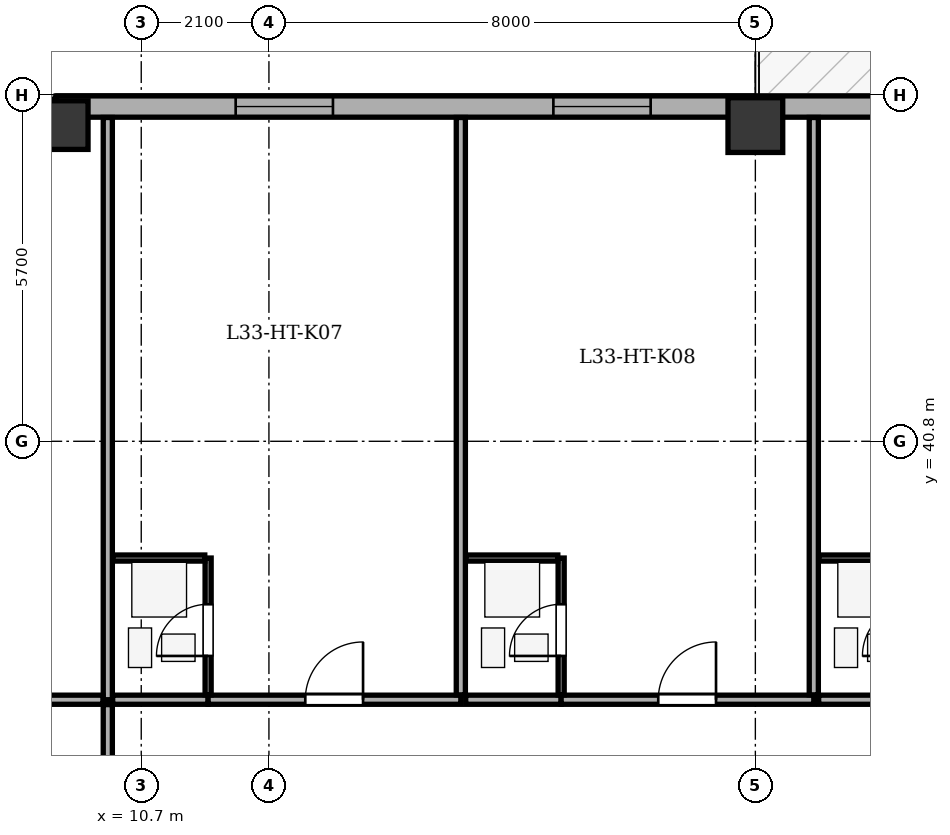
"""IFC4 building model, lengths in metres.
Left out: names, types, materials, properties, quantities, classifications, styles, units other than length and angle.
Written with IfcOpenShell. Run it as: python <this file> out.ifc"""

import sys

from ifc_helpers import new_model, si_unit, direction, frame, frame_2d, origin, origin_2d, place, context, subcontext, project, spatial, rectangle, extrude, element, fill, save


model = new_model("IFC4")
c1 = context("Model", 3, precision=1e-05, world=origin(), true_north=direction((0.0, 1.0)))
c2 = subcontext(c1, "Body", "Model", "MODEL_VIEW")
j1 = project(units=[si_unit("LENGTHUNIT", "METRE"), si_unit("PLANEANGLEUNIT", "RADIAN")], contexts=[c1])
p1 = place(None, origin())
s1 = spatial("IfcSite", under=j1, at=p1, CompositionType="ELEMENT")
p2 = place(p1, origin())
s2 = spatial("IfcBuilding", under=s1, at=p2, CompositionType="ELEMENT")
p3 = place(p2, frame((0.0, 0.0, 134.3)))
s3 = spatial("IfcBuildingStorey", under=s2, at=p3, CompositionType="ELEMENT", Elevation=134.3)
p4 = place(p3, frame((9.3, 46.0, 0.0), z_axis=(0.0, 0.0, 1.0), x_axis=(1.0, 0.0, 0.0)))
e1 = element("IfcColumn", 1, at=p4, inside=s3, PredefinedType="COLUMN", context=c2, shape_type="SweptSolid", body=[
    extrude(rectangle(XDim=0.8, YDim=1.05, at=origin_2d()), origin(), (0.0, 0.0, 1.0), 3.5),
])
p5 = place(p3, frame((20.8, 46.0, 0.0), z_axis=(0.0, 0.0, 1.0), x_axis=(1.0, 0.0, 0.0)))
e2 = element("IfcColumn", 2, at=p5, inside=s3, PredefinedType="COLUMN", context=c2, shape_type="SweptSolid", body=[
    extrude(rectangle(XDim=0.9, YDim=0.9, at=origin_2d()), origin(), (0.0, 0.0, 1.0), 3.5),
])
p6 = place(p3, frame((4.495, 41.5, 0.0), z_axis=(0.0, 0.0, 1.0), x_axis=(0.707106781187, 0.707106781187, 0.0)))
e3 = element("IfcWall", 3, at=p6, inside=s3, PredefinedType="STANDARD", context=c2, shape_type="SweptSolid", body=[
    extrude(rectangle(XDim=6.795, YDim=0.35, at=frame_2d((3.397, 0.0))), origin(), (0.0, 0.0, 1.0), 2.785),
])
p7 = place(p6, frame((2.698, 0.0, 0.75)))
e4 = element("IfcOpeningElement", 4, at=p7, cuts=e3, PredefinedType="OPENING", context=c2, shape_type="SweptSolid", body=[
    extrude(rectangle(XDim=1.4, YDim=1.65, at=frame_2d((0.7, 0.825))), frame((0.0, 0.185, 0.0), z_axis=(0.0, -1.0, 0.0), x_axis=(1.0, 0.0, 0.0)), (0.0, 0.0, 1.0), 0.37),
])
p8 = place(p3, frame((9.3, 46.305, 0.0), z_axis=(0.0, 0.0, 1.0), x_axis=(1.0, 0.0, 0.0)))
e5 = element("IfcWall", 5, at=p8, inside=s3, PredefinedType="STANDARD", context=c2, shape_type="SweptSolid", body=[
    extrude(rectangle(XDim=35.0, YDim=0.35, at=frame_2d((17.5, 0.0))), origin(), (0.0, 0.0, 1.0), 2.785),
])
p9 = place(p8, frame((14.4, 0.0, 0.0)))
e6 = element("IfcOpeningElement", 6, at=p9, cuts=e5, PredefinedType="OPENING", context=c2, shape_type="SweptSolid", body=[
    extrude(rectangle(XDim=1.0, YDim=2.02, at=frame_2d((0.5, 1.01))), frame((0.0, 0.185, 0.0), z_axis=(0.0, -1.0, 0.0), x_axis=(1.0, 0.0, 0.0)), (0.0, 0.0, 1.0), 0.37),
])
p10 = place(p8, frame((2.953, 0.0, 0.75)))
e7 = element("IfcOpeningElement", 7, at=p10, cuts=e5, PredefinedType="OPENING", context=c2, shape_type="SweptSolid", body=[
    extrude(rectangle(XDim=1.6, YDim=1.75, at=frame_2d((0.8, 0.875))), frame((0.0, 0.185, 0.0), z_axis=(0.0, -1.0, 0.0), x_axis=(1.0, 0.0, 0.0)), (0.0, 0.0, 1.0), 0.37),
])
p11 = place(p8, frame((8.178, 0.0, 0.75)))
e8 = element("IfcOpeningElement", 8, at=p11, cuts=e5, PredefinedType="OPENING", context=c2, shape_type="SweptSolid", body=[
    extrude(rectangle(XDim=1.6, YDim=1.75, at=frame_2d((0.8, 0.875))), frame((0.0, 0.185, 0.0), z_axis=(0.0, -1.0, 0.0), x_axis=(1.0, 0.0, 0.0)), (0.0, 0.0, 1.0), 0.37),
])
p12 = place(p8, frame((20.686, 0.0, 0.75)))
e9 = element("IfcOpeningElement", 9, at=p12, cuts=e5, PredefinedType="OPENING", context=c2, shape_type="SweptSolid", body=[
    extrude(rectangle(XDim=1.6, YDim=1.75, at=frame_2d((0.8, 0.875))), frame((0.0, 0.185, 0.0), z_axis=(0.0, -1.0, 0.0), x_axis=(1.0, 0.0, 0.0)), (0.0, 0.0, 1.0), 0.37),
])
p13 = place(p8, frame((27.143, 0.0, 0.75)))
e10 = element("IfcOpeningElement", 10, at=p13, cuts=e5, PredefinedType="OPENING", context=c2, shape_type="SweptSolid", body=[
    extrude(rectangle(XDim=1.35, YDim=1.75, at=frame_2d((0.675, 0.875))), frame((0.0, 0.185, 0.0), z_axis=(0.0, -1.0, 0.0), x_axis=(1.0, 0.0, 0.0)), (0.0, 0.0, 1.0), 0.37),
])
p14 = place(p8, frame((31.33, 0.0, 0.75)))
e11 = element("IfcOpeningElement", 11, at=p14, cuts=e5, PredefinedType="OPENING", context=c2, shape_type="SweptSolid", body=[
    extrude(rectangle(XDim=1.6, YDim=1.75, at=frame_2d((0.8, 0.875))), frame((0.0, 0.185, 0.0), z_axis=(0.0, -1.0, 0.0), x_axis=(1.0, 0.0, 0.0)), (0.0, 0.0, 1.0), 0.37),
])
p15 = place(p3, frame((10.15, 36.55, 0.0), z_axis=(0.0, 0.0, 1.0), x_axis=(0.0, 1.0, 0.0)))
e12 = element("IfcWall", 12, at=p15, inside=s3, PredefinedType="PARTITIONING", context=c2, shape_type="SweptSolid", body=[
    extrude(rectangle(XDim=9.575, YDim=0.15, at=frame_2d((4.788, 0.0))), origin(), (0.0, 0.0, 1.0), 3.2),
])
p16 = place(p3, frame((10.23, 36.55, 0.0), z_axis=(0.0, 0.0, 1.0), x_axis=(1.0, 0.0, 0.0)))
e13 = element("IfcWall", 13, at=p16, inside=s3, PredefinedType="PARTITIONING", context=c2, shape_type="SweptSolid", body=[
    extrude(rectangle(XDim=1.57, YDim=0.15, at=frame_2d((0.785, 0.0))), origin(), (0.0, 0.0, 1.0), 3.2),
])
p17 = place(p3, frame((11.8, 36.55, 0.0), z_axis=(0.0, 0.0, 1.0), x_axis=(1.0, 0.0, 0.0)))
e14 = element("IfcWall", 14, at=p17, inside=s3, PredefinedType="PARTITIONING", context=c2, shape_type="SweptSolid", body=[
    extrude(rectangle(XDim=4.156, YDim=0.15, at=frame_2d((2.078, 0.0))), origin(), (0.0, 0.0, 1.0), 3.2),
])
p18 = place(p17, frame((1.598, 0.0, 0.0)))
e15 = element("IfcOpeningElement", 15, at=p18, cuts=e14, PredefinedType="OPENING", context=c2, shape_type="SweptSolid", body=[
    extrude(rectangle(XDim=0.95, YDim=2.1, at=frame_2d((0.475, 1.05))), frame((0.0, 0.085, 0.0), z_axis=(0.0, -1.0, 0.0), x_axis=(1.0, 0.0, 0.0)), (0.0, 0.0, 1.0), 0.17),
])
p19 = place(p3, frame((11.8, 36.63, 0.0), z_axis=(0.0, 0.0, 1.0), x_axis=(0.0, 1.0, 0.0)))
e16 = element("IfcWall", 16, at=p19, inside=s3, PredefinedType="PARTITIONING", context=c2, shape_type="SweptSolid", body=[
    extrude(rectangle(XDim=2.25, YDim=0.1, at=frame_2d((1.125, 0.0))), origin(), (0.0, 0.0, 1.0), 3.2),
])
p20 = place(p19, frame((0.64, 0.0, 0.0)))
e17 = element("IfcOpeningElement", 17, at=p20, cuts=e16, PredefinedType="OPENING", context=c2, shape_type="SweptSolid", body=[
    extrude(rectangle(XDim=0.85, YDim=2.05, at=frame_2d((0.425, 1.025))), frame((0.0, 0.06, 0.0), z_axis=(0.0, -1.0, 0.0), x_axis=(1.0, 0.0, 0.0)), (0.0, 0.0, 1.0), 0.12),
])
p21 = place(p3, frame((10.23, 38.88, 0.0), z_axis=(0.0, 0.0, 1.0), x_axis=(1.0, 0.0, 0.0)))
e18 = element("IfcWall", 18, at=p21, inside=s3, PredefinedType="PARTITIONING", context=c2, shape_type="SweptSolid", body=[
    extrude(rectangle(XDim=1.515, YDim=0.1, at=frame_2d((0.758, 0.0))), origin(), (0.0, 0.0, 1.0), 3.2),
])
p22 = place(p3, frame((15.956, 36.63, 0.0), z_axis=(0.0, 0.0, 1.0), x_axis=(0.0, 1.0, 0.0)))
e19 = element("IfcWall", 19, at=p22, inside=s3, PredefinedType="PARTITIONING", context=c2, shape_type="SweptSolid", body=[
    extrude(rectangle(XDim=9.495, YDim=0.15, at=frame_2d((4.748, 0.0))), origin(), (0.0, 0.0, 1.0), 3.2),
])
p23 = place(p3, frame((16.036, 36.55, 0.0), z_axis=(0.0, 0.0, 1.0), x_axis=(1.0, 0.0, 0.0)))
e20 = element("IfcWall", 20, at=p23, inside=s3, PredefinedType="PARTITIONING", context=c2, shape_type="SweptSolid", body=[
    extrude(rectangle(XDim=1.57, YDim=0.15, at=frame_2d((0.785, 0.0))), origin(), (0.0, 0.0, 1.0), 3.2),
])
p24 = place(p3, frame((17.606, 36.55, 0.0), z_axis=(0.0, 0.0, 1.0), x_axis=(1.0, 0.0, 0.0)))
e21 = element("IfcWall", 21, at=p24, inside=s3, PredefinedType="PARTITIONING", context=c2, shape_type="SweptSolid", body=[
    extrude(rectangle(XDim=4.155, YDim=0.15, at=frame_2d((2.078, 0.0))), origin(), (0.0, 0.0, 1.0), 3.2),
])
p25 = place(p24, frame((1.597, 0.0, 0.0)))
e22 = element("IfcOpeningElement", 22, at=p25, cuts=e21, PredefinedType="OPENING", context=c2, shape_type="SweptSolid", body=[
    extrude(rectangle(XDim=0.95, YDim=2.1, at=frame_2d((0.475, 1.05))), frame((0.0, 0.085, 0.0), z_axis=(0.0, -1.0, 0.0), x_axis=(1.0, 0.0, 0.0)), (0.0, 0.0, 1.0), 0.17),
])
p26 = place(p3, frame((17.606, 36.63, 0.0), z_axis=(0.0, 0.0, 1.0), x_axis=(0.0, 1.0, 0.0)))
e23 = element("IfcWall", 23, at=p26, inside=s3, PredefinedType="PARTITIONING", context=c2, shape_type="SweptSolid", body=[
    extrude(rectangle(XDim=2.25, YDim=0.1, at=frame_2d((1.125, 0.0))), origin(), (0.0, 0.0, 1.0), 3.2),
])
p27 = place(p26, frame((0.64, 0.0, 0.0)))
e24 = element("IfcOpeningElement", 24, at=p27, cuts=e23, PredefinedType="OPENING", context=c2, shape_type="SweptSolid", body=[
    extrude(rectangle(XDim=0.85, YDim=2.05, at=frame_2d((0.425, 1.025))), frame((0.0, 0.06, 0.0), z_axis=(0.0, -1.0, 0.0), x_axis=(1.0, 0.0, 0.0)), (0.0, 0.0, 1.0), 0.12),
])
p28 = place(p3, frame((16.036, 38.88, 0.0), z_axis=(0.0, 0.0, 1.0), x_axis=(1.0, 0.0, 0.0)))
e25 = element("IfcWall", 25, at=p28, inside=s3, PredefinedType="PARTITIONING", context=c2, shape_type="SweptSolid", body=[
    extrude(rectangle(XDim=1.515, YDim=0.1, at=frame_2d((0.758, 0.0))), origin(), (0.0, 0.0, 1.0), 3.2),
])
p29 = place(p3, frame((21.761, 36.63, 0.0), z_axis=(0.0, 0.0, 1.0), x_axis=(0.0, 1.0, 0.0)))
e26 = element("IfcWall", 26, at=p29, inside=s3, PredefinedType="PARTITIONING", context=c2, shape_type="SweptSolid", body=[
    extrude(rectangle(XDim=9.495, YDim=0.15, at=frame_2d((4.748, 0.0))), origin(), (0.0, 0.0, 1.0), 3.2),
])
p30 = place(p3, frame((21.841, 36.55, 0.0), z_axis=(0.0, 0.0, 1.0), x_axis=(1.0, 0.0, 0.0)))
e27 = element("IfcWall", 27, at=p30, inside=s3, PredefinedType="PARTITIONING", context=c2, shape_type="SweptSolid", body=[
    extrude(rectangle(XDim=1.57, YDim=0.15, at=frame_2d((0.785, 0.0))), origin(), (0.0, 0.0, 1.0), 3.2),
])
p31 = place(p3, frame((21.841, 38.88, 0.0), z_axis=(0.0, 0.0, 1.0), x_axis=(1.0, 0.0, 0.0)))
e28 = element("IfcWall", 28, at=p31, inside=s3, PredefinedType="PARTITIONING", context=c2, shape_type="SweptSolid", body=[
    extrude(rectangle(XDim=1.515, YDim=0.1, at=frame_2d((0.757, 0.0))), origin(), (0.0, 0.0, 1.0), 3.2),
])
p32 = place(p3, frame((4.675, 36.55, 0.0), z_axis=(0.0, 0.0, 1.0), x_axis=(1.0, 0.0, 0.0)))
e29 = element("IfcWall", 29, at=p32, inside=s3, PredefinedType="PARTITIONING", context=c2, shape_type="SweptSolid", body=[
    extrude(rectangle(XDim=5.395, YDim=0.15, at=frame_2d((2.698, 0.0))), origin(), (0.0, 0.0, 1.0), 3.2),
])
p33 = place(p3, frame((10.15, 27.28, 0.0), z_axis=(0.0, 0.0, 1.0), x_axis=(0.0, 1.0, 0.0)))
e30 = element("IfcWall", 30, at=p33, inside=s3, PredefinedType="PARTITIONING", context=c2, shape_type="SweptSolid", body=[
    extrude(rectangle(XDim=9.19, YDim=0.15, at=frame_2d((4.595, 0.0))), origin(), (0.0, 0.0, 1.0), 3.2),
])
p34 = place(p33, frame((4.115, 0.0, 0.0)))
e31 = element("IfcOpeningElement", 31, at=p34, cuts=e30, PredefinedType="OPENING", context=c2, shape_type="SweptSolid", body=[
    extrude(rectangle(XDim=0.95, YDim=2.1, at=frame_2d((0.475, 1.05))), frame((0.0, 0.085, 0.0), z_axis=(0.0, -1.0, 0.0), x_axis=(1.0, 0.0, 0.0)), (0.0, 0.0, 1.0), 0.17),
])
p35 = place(p10, origin())
e32 = element("IfcWindow", 32, at=p35, inside=s3, PartitioningType="SINGLE_PANEL", PredefinedType="WINDOW", context=c2, shape_type="SweptSolid", body=[
    extrude(rectangle(XDim=1.6, YDim=1.75, at=frame_2d((0.8, 0.875))), frame((0.0, -0.01, 0.0), z_axis=(0.0, -1.0, 0.0), x_axis=(1.0, 0.0, 0.0)), (0.0, 0.0, 1.0), 0.06),
])
fill(e7, e32)
p36 = place(p11, origin())
e33 = element("IfcWindow", 33, at=p36, inside=s3, PartitioningType="SINGLE_PANEL", PredefinedType="WINDOW", context=c2, shape_type="SweptSolid", body=[
    extrude(rectangle(XDim=1.6, YDim=1.75, at=frame_2d((0.8, 0.875))), frame((0.0, -0.01, 0.0), z_axis=(0.0, -1.0, 0.0), x_axis=(1.0, 0.0, 0.0)), (0.0, 0.0, 1.0), 0.06),
])
fill(e8, e33)
p37 = place(p20, origin())
e34 = element("IfcDoor", 34, at=p37, inside=s3, OperationType="SINGLE_SWING_LEFT", PredefinedType="DOOR", context=c2, shape_type="SweptSolid", body=[
    extrude(rectangle(XDim=0.85, YDim=2.05, at=frame_2d((0.425, 1.025))), frame((0.0, 0.025, 0.0), z_axis=(0.0, -1.0, 0.0), x_axis=(1.0, 0.0, 0.0)), (0.0, 0.0, 1.0), 0.05),
])
fill(e17, e34)
p38 = place(p18, origin())
e35 = element("IfcDoor", 35, at=p38, inside=s3, OperationType="SINGLE_SWING_RIGHT", PredefinedType="DOOR", context=c2, shape_type="SweptSolid", body=[
    extrude(rectangle(XDim=0.95, YDim=2.1, at=frame_2d((0.475, 1.05))), frame((0.0, 0.025, 0.0), z_axis=(0.0, -1.0, 0.0), x_axis=(1.0, 0.0, 0.0)), (0.0, 0.0, 1.0), 0.05),
])
fill(e15, e35)
p39 = place(p27, origin())
e36 = element("IfcDoor", 36, at=p39, inside=s3, OperationType="SINGLE_SWING_LEFT", PredefinedType="DOOR", context=c2, shape_type="SweptSolid", body=[
    extrude(rectangle(XDim=0.85, YDim=2.05, at=frame_2d((0.425, 1.025))), frame((0.0, 0.025, 0.0), z_axis=(0.0, -1.0, 0.0), x_axis=(1.0, 0.0, 0.0)), (0.0, 0.0, 1.0), 0.05),
])
fill(e24, e36)
p40 = place(p25, origin())
e37 = element("IfcDoor", 37, at=p40, inside=s3, OperationType="SINGLE_SWING_RIGHT", PredefinedType="DOOR", context=c2, shape_type="SweptSolid", body=[
    extrude(rectangle(XDim=0.95, YDim=2.1, at=frame_2d((0.475, 1.05))), frame((0.0, 0.025, 0.0), z_axis=(0.0, -1.0, 0.0), x_axis=(1.0, 0.0, 0.0)), (0.0, 0.0, 1.0), 0.05),
])
fill(e22, e37)
save(model, sys.argv[1])
